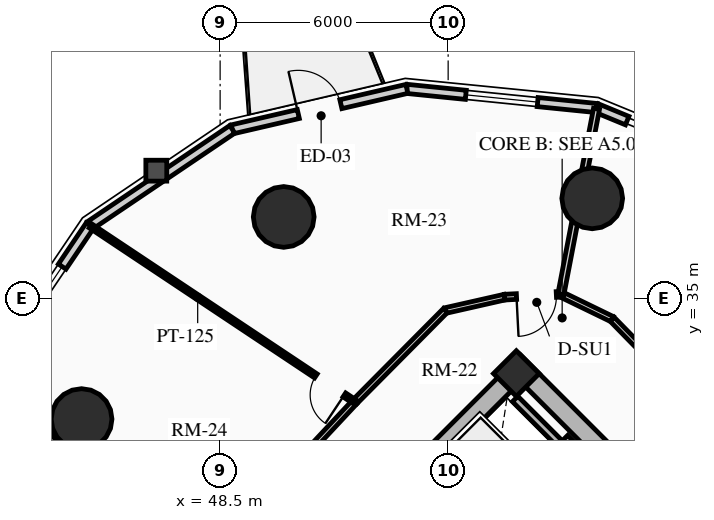
"""IFC4 building model, lengths in metres.
Left out: names, types, materials, properties, quantities, classifications, styles, units other than length and angle.
Written with IfcOpenShell. Run it as: python <this file> out.ifc"""

import sys

from ifc_helpers import new_model, si_unit, direction, frame, frame_2d, origin, origin_2d, place, context, subcontext, project, spatial, rectangle, circle, extrude, source, transform, mapped, element, fill, save


model = new_model("IFC4")
c1 = context("Model", 3, precision=1e-05, world=origin(), true_north=direction((0.0, 1.0)))
c2 = subcontext(c1, "Body", "Model", "MODEL_VIEW")
j1 = project(units=[si_unit("LENGTHUNIT", "METRE"), si_unit("PLANEANGLEUNIT", "RADIAN")], contexts=[c1])
p1 = place(None, origin())
s1 = spatial("IfcSite", under=j1, at=p1, CompositionType="ELEMENT")
p2 = place(p1, origin())
s2 = spatial("IfcBuilding", under=s1, at=p2, CompositionType="ELEMENT")
p3 = place(p2, frame((0.0, 0.0, 24.91)))
s3 = spatial("IfcBuildingStorey", under=s2, at=p3, CompositionType="ELEMENT", Elevation=24.91)
p4 = place(p3, frame((66.339, 23.227, 0.0), z_axis=(0.0, 0.0, 1.0), x_axis=(-0.707106781187, 0.707106781187, 0.0)))
e1 = element("IfcWall", 1, at=p4, inside=s3, PredefinedType="SHEAR", context=c2, shape_type="SweptSolid", body=[
    extrude(rectangle(XDim=14.3, YDim=0.5, at=frame_2d((7.15, 0.0))), origin(), (0.0, 0.0, 1.0), 2.91),
])
p5 = place(p3, frame((48.838, 25.596, 0.0), z_axis=(0.0, 0.0, 1.0), x_axis=(0.707106781187, 0.707106781187, 0.0)))
e2 = element("IfcWall", 2, at=p5, inside=s3, PredefinedType="SHEAR", context=c2, shape_type="SweptSolid", body=[
    extrude(rectangle(XDim=10.7, YDim=0.5, at=frame_2d((5.35, 0.0))), origin(), (0.0, 0.0, 1.0), 2.91),
])
m1 = source(origin(), c2, "Body", "SweptSolid", [
    extrude(rectangle(XDim=1.5, YDim=2.02, at=frame_2d((0.75, 1.01))), frame((0.0, 0.26, 0.0), z_axis=(0.0, -1.0, 0.0), x_axis=(1.0, 0.0, 0.0)), (0.0, 0.0, 1.0), 0.52),
])
p6 = place(p5, frame((4.6, 0.0, 0.0)))
e3 = element("IfcOpeningElement", 3, at=p6, cuts=e2, PredefinedType="OPENING", context=c2, shape_type="MappedRepresentation", body=[
    mapped(m1, transform((0.0, 0.0, 0.0), x_axis=(1.0, 0.0, 0.0), y_axis=(0.0, 1.0, 0.0), z_axis=(0.0, 0.0, 1.0), scale=1.0)),
])
p7 = place(p3, frame((56.294, 33.024, 0.0), z_axis=(0.0, 0.0, 1.0), x_axis=(0.707106781187, 0.707106781187, 0.0)))
e4 = element("IfcColumn", 4, at=p7, inside=s3, PredefinedType="COLUMN", context=c2, shape_type="SweptSolid", body=[
    extrude(rectangle(XDim=0.85, YDim=0.85, at=origin_2d()), origin(), (0.0, 0.0, 1.0), 2.91),
])
for number, where, z_axis, x_axis in (
    (5, (58.291, 37.635, 0.0), (0.0, 0.0, 1.0), (1.0, 0.0, 0.0)),
    (6, (50.173, 37.146, 0.0), (0.0, 0.0, 1.0), (1.0, 0.0, 0.0)),
    (7, (44.854, 31.827, 0.0), (0.0, 0.0, 1.0), (1.0, 0.0, 0.0)),
):
    element("IfcColumn", number, at=place(p3, frame(where, z_axis=z_axis, x_axis=x_axis)), inside=s3, PredefinedType="USERDEFINED", context=c2, shape_type="SweptSolid", body=[
        extrude(circle(Radius=0.8, at=origin_2d()), origin(), (0.0, 0.0, 1.0), 2.91),
    ])
p8 = place(p3, frame((58.407, 40.012, 0.0), z_axis=(0.0, 0.0, 1.0), x_axis=(0.924556017656, -0.381046152345, 0.0)))
e8 = element("IfcWall", 8, at=p8, inside=s3, PredefinedType="SOLIDWALL", context=c2, shape_type="SweptSolid", body=[
    extrude(rectangle(XDim=0.87, YDim=0.24, at=frame_2d((0.435, 0.0))), origin(), (0.0, 0.0, 1.0), 2.073),
])
p9 = place(p3, frame((53.414, 40.516, 0.0), z_axis=(0.0, 0.0, 1.0), x_axis=(0.994951574538, -0.100356187272, 0.0)))
e9 = element("IfcWall", 9, at=p9, inside=s3, PredefinedType="SOLIDWALL", context=c2, shape_type="SweptSolid", body=[
    extrude(rectangle(XDim=5.019, YDim=0.24, at=frame_2d((2.509, 0.0))), origin(), (0.0, 0.0, 1.0), 2.073),
])
m2 = source(origin(), c2, "Body", "SweptSolid", [
    extrude(rectangle(XDim=1.9, YDim=1.35, at=frame_2d((0.95, 0.675))), frame((0.0, 0.13, 0.0), z_axis=(0.0, -1.0, 0.0), x_axis=(1.0, 0.0, 0.0)), (0.0, 0.0, 1.0), 0.26),
])
p10 = place(p9, frame((1.559, 0.0, 0.65)))
e10 = element("IfcOpeningElement", 10, at=p10, cuts=e9, PredefinedType="OPENING", context=c2, shape_type="MappedRepresentation", body=[
    mapped(m2, transform((0.0, 0.0, 0.0), x_axis=(1.0, 0.0, 0.0), y_axis=(0.0, 1.0, 0.0), z_axis=(0.0, 0.0, 1.0), scale=1.0)),
])
p11 = place(p3, frame((48.82, 39.452, 0.0), z_axis=(0.0, 0.0, 1.0), x_axis=(0.974197104074, 0.225698919833, 0.0)))
e11 = element("IfcWall", 11, at=p11, inside=s3, PredefinedType="SOLIDWALL", context=c2, shape_type="SweptSolid", body=[
    extrude(rectangle(XDim=4.715, YDim=0.24, at=frame_2d((2.357, 0.0))), origin(), (0.0, 0.0, 1.0), 2.073),
])
m3 = source(origin(), c2, "Body", "SweptSolid", [
    extrude(rectangle(XDim=1.15, YDim=2.005, at=frame_2d((0.575, 1.002))), frame((0.0, 0.13, 0.0), z_axis=(0.0, -1.0, 0.0), x_axis=(1.0, 0.0, 0.0)), (0.0, 0.0, 1.0), 0.26),
])
p12 = place(p11, frame((1.783, 0.0, 0.0)))
e12 = element("IfcOpeningElement", 12, at=p12, cuts=e11, PredefinedType="OPENING", context=c2, shape_type="MappedRepresentation", body=[
    mapped(m3, transform((0.0, 0.0, 0.0), x_axis=(1.0, 0.0, 0.0), y_axis=(0.0, 1.0, 0.0), z_axis=(0.0, 0.0, 1.0), scale=1.0)),
])
p13 = place(p3, frame((45.076, 36.924, 0.0), z_axis=(0.0, 0.0, 1.0), x_axis=(0.828776615238, 0.559579594012, 0.0)))
e13 = element("IfcWall", 13, at=p13, inside=s3, PredefinedType="SOLIDWALL", context=c2, shape_type="SweptSolid", body=[
    extrude(rectangle(XDim=4.517, YDim=0.24, at=frame_2d((2.259, 0.0))), origin(), (0.0, 0.0, 1.0), 2.073),
])
p14 = place(p3, frame((42.548, 33.18, 0.0), z_axis=(0.0, 0.0, 1.0), x_axis=(0.559579594012, 0.828776615238, 0.0)))
e14 = element("IfcWall", 14, at=p14, inside=s3, PredefinedType="SOLIDWALL", context=c2, shape_type="SweptSolid", body=[
    extrude(rectangle(XDim=4.517, YDim=0.24, at=frame_2d((2.259, 0.0))), origin(), (0.0, 0.0, 1.0), 2.073),
])
p15 = place(p14, frame((1.309, 0.0, 0.65)))
e15 = element("IfcOpeningElement", 15, at=p15, cuts=e14, PredefinedType="OPENING", context=c2, shape_type="MappedRepresentation", body=[
    mapped(m2, transform((0.0, 0.0, 0.0), x_axis=(1.0, 0.0, 0.0), y_axis=(0.0, 1.0, 0.0), z_axis=(0.0, 0.0, 1.0), scale=1.0)),
])
p16 = place(p3, frame((55.615, 29.227, 0.0), z_axis=(0.0, 0.0, 1.0), x_axis=(0.707147878904, 0.70706568108, 0.0)))
e16 = element("IfcWall", 16, at=p16, inside=s3, PredefinedType="SHEAR", context=c2, shape_type="SweptSolid", body=[
    extrude(rectangle(XDim=2.97, YDim=0.2, at=frame_2d((1.485, 0.0))), origin(), (0.0, 0.0, 1.0), 2.91),
])
p17 = place(p3, frame((57.419, 31.2, 0.0), z_axis=(0.0, 0.0, 1.0), x_axis=(-0.707032117043, 0.707181437447, 0.0)))
e17 = element("IfcWall", 17, at=p17, inside=s3, PredefinedType="SHEAR", context=c2, shape_type="SweptSolid", body=[
    extrude(rectangle(XDim=1.635, YDim=0.2, at=frame_2d((0.817, 0.0))), origin(), (0.0, 0.0, 1.0), 2.91),
])
p18 = place(p3, frame((63.086, 30.086, 0.0), z_axis=(0.0, 0.0, 1.0), x_axis=(-0.699075897379, 0.715047473741, 0.0)))
e18 = element("IfcWall", 18, at=p18, inside=s3, PredefinedType="PARTITIONING", context=c2, shape_type="SweptSolid", body=[
    extrude(rectangle(XDim=6.114, YDim=0.15, at=frame_2d((3.057, 0.0))), origin(), (0.0, 0.0, 1.0), 2.159),
])
m4 = source(origin(), c2, "Body", "SweptSolid", [
    extrude(rectangle(XDim=1.05, YDim=2.015, at=frame_2d((0.525, 1.007))), frame((0.0, 0.085, 0.0), z_axis=(0.0, -1.0, 0.0), x_axis=(1.0, 0.0, 0.0)), (0.0, 0.0, 1.0), 0.17),
])
p19 = place(p18, frame((2.532, 0.0, 0.0)))
e19 = element("IfcOpeningElement", 19, at=p19, cuts=e18, PredefinedType="OPENING", context=c2, shape_type="MappedRepresentation", body=[
    mapped(m4, transform((0.0, 0.0, 0.0), x_axis=(1.0, 0.0, 0.0), y_axis=(0.0, 1.0, 0.0), z_axis=(0.0, 0.0, 1.0), scale=1.0)),
])
p20 = place(p3, frame((58.812, 34.458, 0.0), z_axis=(0.0, 0.0, 1.0), x_axis=(-0.899559490277, 0.436798264021, 0.0)))
e20 = element("IfcWall", 20, at=p20, inside=s3, PredefinedType="PARTITIONING", context=c2, shape_type="SweptSolid", body=[
    extrude(rectangle(XDim=1.495, YDim=0.15, at=frame_2d((0.748, 0.0))), origin(), (0.0, 0.0, 1.0), 2.205),
])
p21 = place(p3, frame((57.467, 35.111, 0.0), z_axis=(0.0, 0.0, 1.0), x_axis=(-0.998691757323, -0.051134859488, 0.0)))
e21 = element("IfcWall", 21, at=p21, inside=s3, PredefinedType="PARTITIONING", context=c2, shape_type="SweptSolid", body=[
    extrude(rectangle(XDim=1.485, YDim=0.15, at=frame_2d((0.742, 0.0))), origin(), (0.0, 0.0, 1.0), 2.159),
])
p22 = place(p21, frame((0.12, 0.0, 0.0)))
e22 = element("IfcOpeningElement", 22, at=p22, cuts=e21, PredefinedType="OPENING", context=c2, shape_type="MappedRepresentation", body=[
    mapped(m4, transform((0.0, 0.0, 0.0), x_axis=(1.0, 0.0, 0.0), y_axis=(0.0, 1.0, 0.0), z_axis=(0.0, 0.0, 1.0), scale=1.0)),
])
p23 = place(p3, frame((55.984, 35.035, 0.0), z_axis=(0.0, 0.0, 1.0), x_axis=(-0.975290305708, -0.22092718165, 0.0)))
e23 = element("IfcWall", 23, at=p23, inside=s3, PredefinedType="PARTITIONING", context=c2, shape_type="SweptSolid", body=[
    extrude(rectangle(XDim=1.597, YDim=0.15, at=frame_2d((0.798, 0.0))), origin(), (0.0, 0.0, 1.0), 2.205),
])
p24 = place(p3, frame((54.427, 34.683, 0.0), z_axis=(0.0, 0.0, 1.0), x_axis=(-0.704178989986, -0.710022499687, 0.0)))
e24 = element("IfcWall", 24, at=p24, inside=s3, PredefinedType="PARTITIONING", context=c2, shape_type="SweptSolid", body=[
    extrude(rectangle(XDim=3.384, YDim=0.15, at=frame_2d((1.692, 0.0))), origin(), (0.0, 0.0, 1.0), 2.159),
])
p25 = place(p3, frame((52.043, 32.28, 0.0), z_axis=(0.0, 0.0, 1.0), x_axis=(-0.682606081633, -0.730786519661, 0.0)))
e25 = element("IfcWall", 25, at=p25, inside=s3, PredefinedType="PARTITIONING", context=c2, shape_type="SweptSolid", body=[
    extrude(rectangle(XDim=6.527, YDim=0.15, at=frame_2d((3.263, 0.0))), origin(), (0.0, 0.0, 1.0), 2.159),
])
p26 = place(p3, frame((57.467, 35.111, 0.0), z_axis=(0.0, 0.0, 1.0), x_axis=(0.188572285328, 0.982059312468, 0.0)))
e26 = element("IfcWall", 26, at=p26, inside=s3, PredefinedType="PARTITIONING", context=c2, shape_type="SweptSolid", body=[
    extrude(rectangle(XDim=4.97, YDim=0.16, at=frame_2d((2.485, 0.0))), origin(), (0.0, 0.0, 1.0), 2.073),
])
p27 = place(p3, frame((47.588, 27.51, 0.0), z_axis=(0.0, 0.0, 1.0), x_axis=(-0.663646630644, 0.74804622159, 0.0)))
e27 = element("IfcWall", 27, at=p27, inside=s3, PredefinedType="MOVABLE", context=c2, shape_type="SweptSolid", body=[
    extrude(rectangle(XDim=7.567, YDim=0.1, at=frame_2d((3.784, 0.0))), origin(), (0.0, 0.0, 1.0), 2.073),
])
p28 = place(p3, frame((52.043, 32.28, 0.0), z_axis=(0.0, 0.0, 1.0), x_axis=(-0.832355916658, 0.554241488887, 0.0)))
e28 = element("IfcWall", 28, at=p28, inside=s3, PredefinedType="PARTITIONING", context=c2, shape_type="SweptSolid", body=[
    extrude(rectangle(XDim=8.354, YDim=0.125, at=frame_2d((4.177, 0.0))), origin(), (0.0, 0.0, 1.0), 2.073),
])
m5 = source(origin(), c2, "Body", "SweptSolid", [
    extrude(rectangle(XDim=0.9, YDim=2.005, at=frame_2d((0.45, 1.002))), frame((0.0, 0.073, 0.0), z_axis=(0.0, -1.0, 0.0), x_axis=(1.0, 0.0, 0.0)), (0.0, 0.0, 1.0), 0.145),
])
p29 = place(p28, frame((0.33, 0.0, 0.0)))
e29 = element("IfcOpeningElement", 29, at=p29, cuts=e28, PredefinedType="OPENING", context=c2, shape_type="MappedRepresentation", body=[
    mapped(m5, transform((0.0, 0.0, 0.0), x_axis=(1.0, 0.0, 0.0), y_axis=(0.0, 1.0, 0.0), z_axis=(0.0, 0.0, 1.0), scale=1.0)),
])
m6 = source(origin(), c2, "Body", "SweptSolid", [
    extrude(rectangle(XDim=1.9, YDim=1.35, at=frame_2d((0.95, 0.675))), frame((0.0, 0.03, 0.0), z_axis=(0.0, -1.0, 0.0), x_axis=(1.0, 0.0, 0.0)), (0.0, 0.0, 1.0), 0.06),
])
p30 = place(p10, origin())
e30 = element("IfcWindow", 30, at=p30, inside=s3, PartitioningType="DOUBLE_PANEL_VERTICAL", PredefinedType="WINDOW", context=c2, shape_type="MappedRepresentation", body=[
    mapped(m6, transform((0.0, 0.0, 0.0), x_axis=(1.0, 0.0, 0.0), y_axis=(0.0, 1.0, 0.0), z_axis=(0.0, 0.0, 1.0), scale=1.0)),
])
fill(e10, e30)
m7 = source(origin(), c2, "Body", "SweptSolid", [
    extrude(rectangle(XDim=1.15, YDim=2.005, at=frame_2d((0.575, 1.002))), frame((0.0, 0.025, 0.0), z_axis=(0.0, -1.0, 0.0), x_axis=(1.0, 0.0, 0.0)), (0.0, 0.0, 1.0), 0.05),
])
p31 = place(p12, origin())
e31 = element("IfcDoor", 31, at=p31, inside=s3, OperationType="SINGLE_SWING_LEFT", PredefinedType="DOOR", context=c2, shape_type="MappedRepresentation", body=[
    mapped(m7, transform((0.0, 0.0, 0.0), x_axis=(1.0, 0.0, 0.0), y_axis=(0.0, 1.0, 0.0), z_axis=(0.0, 0.0, 1.0), scale=1.0)),
])
fill(e12, e31)
p32 = place(p15, origin())
e32 = element("IfcWindow", 32, at=p32, inside=s3, PartitioningType="DOUBLE_PANEL_VERTICAL", PredefinedType="WINDOW", context=c2, shape_type="MappedRepresentation", body=[
    mapped(m6, transform((0.0, 0.0, 0.0), x_axis=(1.0, 0.0, 0.0), y_axis=(0.0, 1.0, 0.0), z_axis=(0.0, 0.0, 1.0), scale=1.0)),
])
fill(e15, e32)
m8 = source(origin(), c2, "Body", "SweptSolid", [
    extrude(rectangle(XDim=1.05, YDim=2.015, at=frame_2d((0.525, 1.007))), frame((0.0, 0.025, 0.0), z_axis=(0.0, -1.0, 0.0), x_axis=(1.0, 0.0, 0.0)), (0.0, 0.0, 1.0), 0.05),
])
p33 = place(p22, origin())
e33 = element("IfcDoor", 33, at=p33, inside=s3, OperationType="SINGLE_SWING_RIGHT", PredefinedType="DOOR", context=c2, shape_type="MappedRepresentation", body=[
    mapped(m8, transform((0.0, 0.0, 0.0), x_axis=(1.0, 0.0, 0.0), y_axis=(0.0, 1.0, 0.0), z_axis=(0.0, 0.0, 1.0), scale=1.0)),
])
fill(e22, e33)
m9 = source(origin(), c2, "Body", "SweptSolid", [
    extrude(rectangle(XDim=0.9, YDim=2.005, at=frame_2d((0.45, 1.002))), frame((0.0, 0.025, 0.0), z_axis=(0.0, -1.0, 0.0), x_axis=(1.0, 0.0, 0.0)), (0.0, 0.0, 1.0), 0.05),
])
p34 = place(p29, origin())
e34 = element("IfcDoor", 34, at=p34, inside=s3, OperationType="SINGLE_SWING_LEFT", PredefinedType="DOOR", context=c2, shape_type="MappedRepresentation", body=[
    mapped(m9, transform((0.0, 0.0, 0.0), x_axis=(1.0, 0.0, 0.0), y_axis=(0.0, 1.0, 0.0), z_axis=(0.0, 0.0, 1.0), scale=1.0)),
])
fill(e29, e34)
save(model, sys.argv[1])
